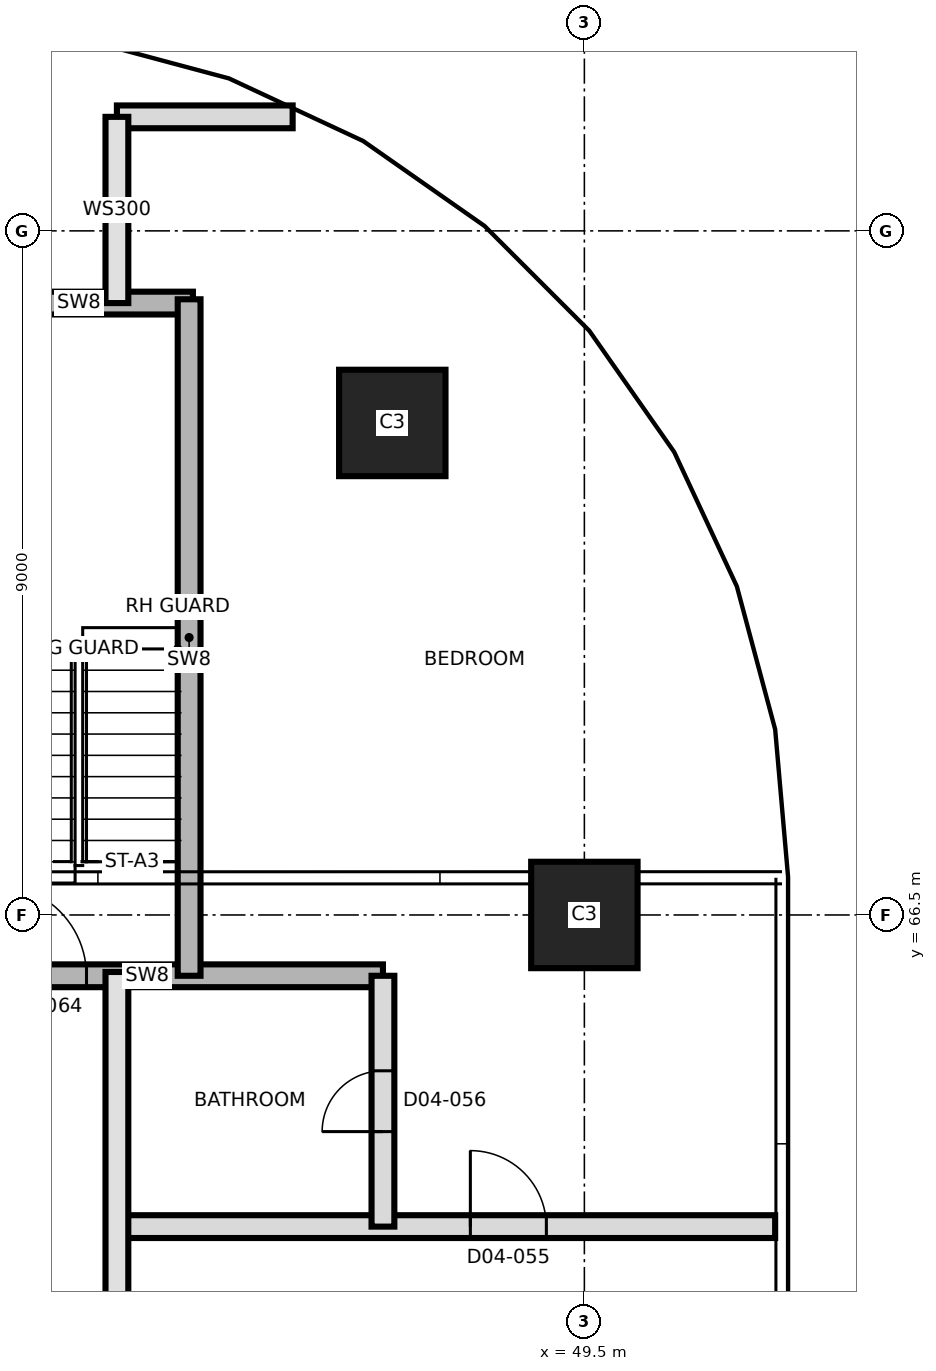
"""IFC4 building model, lengths in metres.
Left out: names, types, materials, properties, quantities, classifications, styles, units other than length and angle.
Written with IfcOpenShell. Run it as: python <this file> out.ifc"""

import sys

from ifc_helpers import new_model, si_unit, direction, frame, frame_2d, origin, origin_2d, place, context, subcontext, project, spatial, rectangle, extrude, element, fill, save


model = new_model("IFC4")
c1 = context("Model", 3, precision=1e-05, world=origin(), true_north=direction((0.0, 1.0)))
c2 = subcontext(c1, "Body", "Model", "MODEL_VIEW")
j1 = project(units=[si_unit("LENGTHUNIT", "METRE"), si_unit("PLANEANGLEUNIT", "RADIAN")], contexts=[c1])
p1 = place(None, origin())
s1 = spatial("IfcSite", under=j1, at=p1, CompositionType="ELEMENT")
p2 = place(p1, origin())
s2 = spatial("IfcBuilding", under=s1, at=p2, CompositionType="ELEMENT")
p3 = place(p2, frame((0.0, 0.0, 66.8)))
s3 = spatial("IfcBuildingStorey", under=s2, at=p3, CompositionType="ELEMENT", Elevation=66.8)
for number, where, z_axis, x_axis in (
    (1, (49.5, 66.5, 0.0), (0.0, 0.0, 1.0), (1.0, 0.0, 0.0)),
    (2, (46.973, 72.973, 0.0), (0.0, 0.0, 1.0), (1.0, 0.0, 0.0)),
):
    element("IfcColumn", number, at=place(p3, frame(where, z_axis=z_axis, x_axis=x_axis)), inside=s3, PredefinedType="COLUMN", context=c2, shape_type="SweptSolid", body=[
        extrude(rectangle(XDim=1.4, YDim=1.4, at=origin_2d()), origin(), (0.0, 0.0, 1.0), 3.7),
    ])
p4 = place(p3, frame((43.35, 62.4, 0.0), z_axis=(0.0, 0.0, 1.0), x_axis=(1.0, 0.0, 0.0)))
e3 = element("IfcWall", 3, at=p4, inside=s3, PredefinedType="PARTITIONING", context=c2, shape_type="SweptSolid", body=[
    extrude(rectangle(XDim=8.66, YDim=0.3, at=frame_2d((4.33, 0.0))), origin(), (0.0, 0.0, 1.0), 3.35),
])
p5 = place(p4, frame((4.65, 0.0, 0.0)))
e4 = element("IfcOpeningElement", 4, at=p5, cuts=e3, PredefinedType="OPENING", context=c2, shape_type="SweptSolid", body=[
    extrude(rectangle(XDim=1.0, YDim=2.1, at=frame_2d((0.5, 1.05))), frame((0.0, 0.16, 0.0), z_axis=(0.0, -1.0, 0.0), x_axis=(1.0, 0.0, 0.0)), (0.0, 0.0, 1.0), 0.32),
])
p6 = place(p3, frame((40.65, 65.7, 0.0), z_axis=(0.0, 0.0, 1.0), x_axis=(1.0, 0.0, 0.0)))
e5 = element("IfcWall", 5, at=p6, inside=s3, PredefinedType="SHEAR", context=c2, shape_type="SweptSolid", body=[
    extrude(rectangle(XDim=6.2, YDim=0.3, at=frame_2d((3.1, 0.0))), origin(), (0.0, 0.0, 1.0), 3.4),
])
p7 = place(p6, frame((1.1, 0.0, 0.0)))
e6 = element("IfcOpeningElement", 6, at=p7, cuts=e5, PredefinedType="OPENING", context=c2, shape_type="SweptSolid", body=[
    extrude(rectangle(XDim=1.2, YDim=2.1, at=frame_2d((0.6, 1.05))), frame((0.0, 0.16, 0.0), z_axis=(0.0, -1.0, 0.0), x_axis=(1.0, 0.0, 0.0)), (0.0, 0.0, 1.0), 0.32),
])
p8 = place(p3, frame((41.35, 74.55, 0.0), z_axis=(0.0, 0.0, 1.0), x_axis=(1.0, 0.0, 0.0)))
e7 = element("IfcWall", 7, at=p8, inside=s3, PredefinedType="SHEAR", context=c2, shape_type="SweptSolid", body=[
    extrude(rectangle(XDim=3.0, YDim=0.3, at=frame_2d((1.5, 0.0))), origin(), (0.0, 0.0, 1.0), 3.4),
])
p9 = place(p3, frame((43.35, 77.0, 0.0), z_axis=(0.0, 0.0, 1.0), x_axis=(1.0, 0.0, 0.0)))
e8 = element("IfcWall", 8, at=p9, inside=s3, PredefinedType="PARTITIONING", context=c2, shape_type="SweptSolid", body=[
    extrude(rectangle(XDim=2.312, YDim=0.3, at=frame_2d((1.156, 0.0))), origin(), (0.0, 0.0, 1.0), 3.35),
])
p10 = place(p3, frame((43.35, 39.95, 0.0), z_axis=(0.0, 0.0, 1.0), x_axis=(0.0, 1.0, 0.0)))
e9 = element("IfcWall", 9, at=p10, inside=s3, PredefinedType="SOLIDWALL", context=c2, shape_type="SweptSolid", body=[
    extrude(rectangle(XDim=25.8, YDim=0.3, at=frame_2d((12.9, 0.0))), origin(), (0.0, 0.0, 1.0), 3.4),
])
p11 = place(p10, frame((2.47, 0.0, 0.0)))
e10 = element("IfcOpeningElement", 10, at=p11, cuts=e9, PredefinedType="OPENING", context=c2, shape_type="SweptSolid", body=[
    extrude(rectangle(XDim=1.0, YDim=2.1, at=frame_2d((0.5, 1.05))), frame((0.0, 0.16, 0.0), z_axis=(0.0, -1.0, 0.0), x_axis=(1.0, 0.0, 0.0)), (0.0, 0.0, 1.0), 0.32),
])
p12 = place(p10, frame((4.27, 0.0, 0.0)))
e11 = element("IfcOpeningElement", 11, at=p12, cuts=e9, PredefinedType="OPENING", context=c2, shape_type="SweptSolid", body=[
    extrude(rectangle(XDim=1.0, YDim=2.1, at=frame_2d((0.5, 1.05))), frame((0.0, 0.16, 0.0), z_axis=(0.0, -1.0, 0.0), x_axis=(1.0, 0.0, 0.0)), (0.0, 0.0, 1.0), 0.32),
])
p13 = place(p10, frame((12.55, 0.0, 0.0)))
e12 = element("IfcOpeningElement", 12, at=p13, cuts=e9, PredefinedType="OPENING", context=c2, shape_type="SweptSolid", body=[
    extrude(rectangle(XDim=1.0, YDim=2.4, at=frame_2d((0.5, 1.2))), frame((0.0, 0.16, 0.0), z_axis=(0.0, -1.0, 0.0), x_axis=(1.0, 0.0, 0.0)), (0.0, 0.0, 1.0), 0.32),
])
p14 = place(p10, frame((19.55, 0.0, 0.0)))
e13 = element("IfcOpeningElement", 13, at=p14, cuts=e9, PredefinedType="OPENING", context=c2, shape_type="SweptSolid", body=[
    extrude(rectangle(XDim=1.0, YDim=2.4, at=frame_2d((0.5, 1.2))), frame((0.0, 0.16, 0.0), z_axis=(0.0, -1.0, 0.0), x_axis=(1.0, 0.0, 0.0)), (0.0, 0.0, 1.0), 0.32),
])
p15 = place(p3, frame((43.35, 74.55, 0.0), z_axis=(0.0, 0.0, 1.0), x_axis=(0.0, 1.0, 0.0)))
e14 = element("IfcWall", 14, at=p15, inside=s3, PredefinedType="SOLIDWALL", context=c2, shape_type="SweptSolid", body=[
    extrude(rectangle(XDim=2.45, YDim=0.3, at=frame_2d((1.225, 0.0))), origin(), (0.0, 0.0, 1.0), 3.35),
])
p16 = place(p3, frame((44.3, 65.7, 0.0), z_axis=(0.0, 0.0, 1.0), x_axis=(0.0, 1.0, 0.0)))
e15 = element("IfcWall", 15, at=p16, inside=s3, PredefinedType="SHEAR", context=c2, shape_type="SweptSolid", body=[
    extrude(rectangle(XDim=8.9, YDim=0.3, at=frame_2d((4.45, 0.0))), origin(), (0.0, 0.0, 1.0), 3.4),
])
p17 = place(p3, frame((46.85, 62.4, 0.0), z_axis=(0.0, 0.0, 1.0), x_axis=(0.0, 1.0, 0.0)))
e16 = element("IfcWall", 16, at=p17, inside=s3, PredefinedType="PARTITIONING", context=c2, shape_type="SweptSolid", body=[
    extrude(rectangle(XDim=3.3, YDim=0.3, at=frame_2d((1.65, 0.0))), origin(), (0.0, 0.0, 1.0), 3.4),
])
p18 = place(p17, frame((1.25, 0.0, 0.0)))
e17 = element("IfcOpeningElement", 17, at=p18, cuts=e16, PredefinedType="OPENING", context=c2, shape_type="SweptSolid", body=[
    extrude(rectangle(XDim=0.8, YDim=2.1, at=frame_2d((0.4, 1.05))), frame((0.0, 0.16, 0.0), z_axis=(0.0, -1.0, 0.0), x_axis=(1.0, 0.0, 0.0)), (0.0, 0.0, 1.0), 0.32),
])
p19 = place(p5, origin())
e18 = element("IfcDoor", 18, at=p19, inside=s3, OperationType="SINGLE_SWING_RIGHT", PredefinedType="DOOR", context=c2, shape_type="SweptSolid", body=[
    extrude(rectangle(XDim=1.0, YDim=2.1, at=frame_2d((0.5, 1.05))), frame((0.0, 0.025, 0.0), z_axis=(0.0, -1.0, 0.0), x_axis=(1.0, 0.0, 0.0)), (0.0, 0.0, 1.0), 0.05),
])
fill(e4, e18)
p20 = place(p18, origin())
e19 = element("IfcDoor", 19, at=p20, inside=s3, OperationType="SINGLE_SWING_LEFT", PredefinedType="DOOR", context=c2, shape_type="SweptSolid", body=[
    extrude(rectangle(XDim=0.8, YDim=2.1, at=frame_2d((0.4, 1.05))), frame((0.0, 0.025, 0.0), z_axis=(0.0, -1.0, 0.0), x_axis=(1.0, 0.0, 0.0)), (0.0, 0.0, 1.0), 0.05),
])
fill(e17, e19)
p21 = place(p7, origin())
e20 = element("IfcDoor", 20, at=p21, inside=s3, OperationType="SINGLE_SWING_RIGHT", PredefinedType="DOOR", context=c2, shape_type="SweptSolid", body=[
    extrude(rectangle(XDim=1.2, YDim=2.1, at=frame_2d((0.6, 1.05))), frame((0.0, 0.025, 0.0), z_axis=(0.0, -1.0, 0.0), x_axis=(1.0, 0.0, 0.0)), (0.0, 0.0, 1.0), 0.05),
])
fill(e6, e20)
save(model, sys.argv[1])
